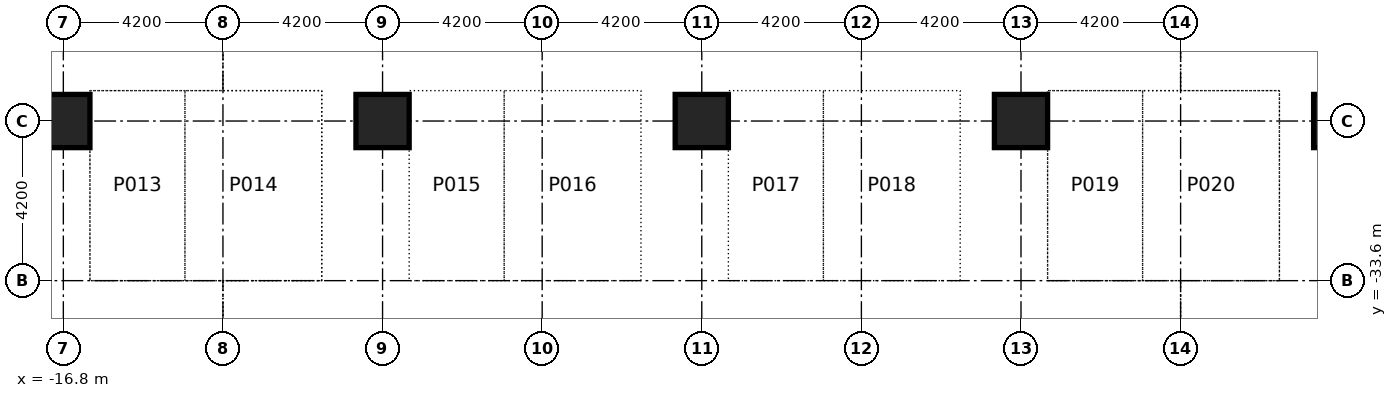
"""IFC4 building model, lengths in metres.
Left out: names, types, materials, properties, quantities, classifications, styles, units other than length and angle.
Written with IfcOpenShell. Run it as: python <this file> out.ifc"""

import sys

from ifc_helpers import new_model, si_unit, direction, frame, origin, origin_2d, place, context, subcontext, project, spatial, rectangle, extrude, element, save


model = new_model("IFC4")
c1 = context("Model", 3, precision=1e-05, world=origin(), true_north=direction((0.0, 1.0)))
c2 = subcontext(c1, "Body", "Model", "MODEL_VIEW")
j1 = project(units=[si_unit("LENGTHUNIT", "METRE"), si_unit("PLANEANGLEUNIT", "RADIAN")], contexts=[c1])
p1 = place(None, origin())
s1 = spatial("IfcSite", under=j1, at=p1, CompositionType="ELEMENT")
p2 = place(p1, origin())
s2 = spatial("IfcBuilding", under=s1, at=p2, CompositionType="ELEMENT")
p3 = place(p2, frame((0.0, 0.0, -8.4)))
s3 = spatial("IfcBuildingStorey", under=s2, at=p3, CompositionType="ELEMENT", Elevation=-8.4)
for number, where, z_axis, x_axis in (
    (1, (-16.8, -29.4, -0.5), (0.0, 0.0, 1.0), (1.0, 0.0, 0.0)),
    (2, (-8.4, -29.4, -0.5), (0.0, 0.0, 1.0), (1.0, 0.0, 0.0)),
    (3, (0.0, -29.4, -0.5), (0.0, 0.0, 1.0), (1.0, 0.0, 0.0)),
    (4, (8.4, -29.4, -0.5), (0.0, 0.0, 1.0), (1.0, 0.0, 0.0)),
    (5, (16.8, -29.4, -0.5), (0.0, 0.0, 1.0), (1.0, 0.0, 0.0)),
):
    element("IfcColumn", number, at=place(p3, frame(where, z_axis=z_axis, x_axis=x_axis)), inside=s3, PredefinedType="COLUMN", context=c2, shape_type="SweptSolid", body=[
        extrude(rectangle(XDim=1.4, YDim=1.4, at=origin_2d()), origin(), (0.0, 0.0, 1.0), 4.7),
    ])
save(model, sys.argv[1])
